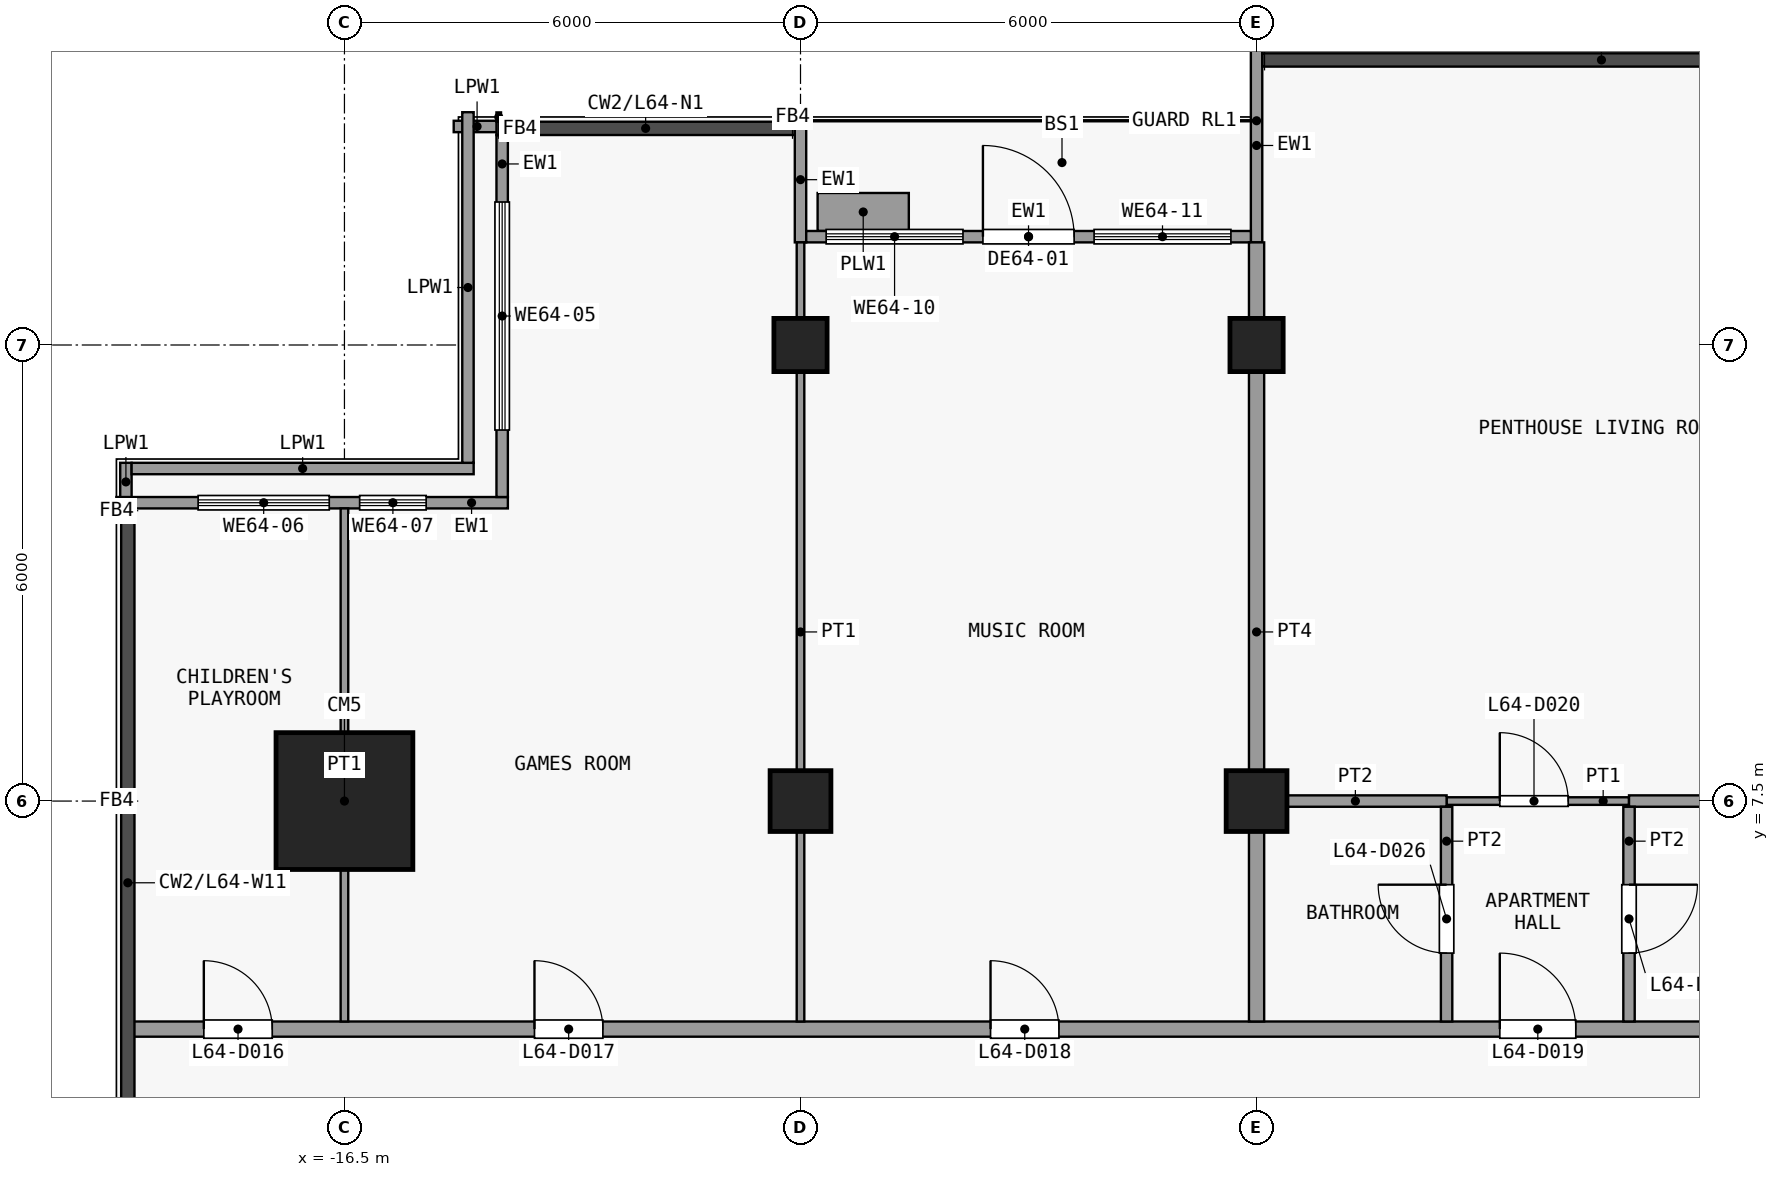
"""IFC4 building model, lengths in metres.
Left out: names, types, materials, properties, quantities, classifications, styles, units other than length and angle.
Written with IfcOpenShell. Run it as: python <this file> out.ifc"""

import sys

from ifc_helpers import new_model, si_unit, direction, frame, frame_2d, origin, origin_2d, place, context, subcontext, project, spatial, rectangle, extrude, element, fill, save


model = new_model("IFC4")
c1 = context("Model", 3, precision=1e-05, world=origin(), true_north=direction((0.0, 1.0)))
c2 = subcontext(c1, "Body", "Model", "MODEL_VIEW")
j1 = project(units=[si_unit("LENGTHUNIT", "METRE"), si_unit("PLANEANGLEUNIT", "RADIAN")], contexts=[c1])
p1 = place(None, origin())
s1 = spatial("IfcSite", under=j1, at=p1, CompositionType="ELEMENT")
p2 = place(p1, origin())
s2 = spatial("IfcBuilding", under=s1, at=p2, CompositionType="ELEMENT")
p3 = place(p2, frame((0.0, 0.0, 255.5)))
s3 = spatial("IfcBuildingStorey", under=s2, at=p3, CompositionType="ELEMENT", Elevation=255.5)
p4 = place(p3, frame((-16.5, 7.5, 0.0), z_axis=(0.0, 0.0, 1.0), x_axis=(1.0, 0.0, 0.0)))
e1 = element("IfcColumn", 1, at=p4, inside=s3, PredefinedType="COLUMN", context=c2, shape_type="SweptSolid", body=[
    extrude(rectangle(XDim=1.8, YDim=1.8, at=origin_2d()), origin(), (0.0, 0.0, 1.0), 3.6),
])
p5 = place(p3, frame((-10.5, 7.5, 0.0), z_axis=(0.0, 0.0, 1.0), x_axis=(1.0, 0.0, 0.0)))
e2 = element("IfcColumn", 2, at=p5, inside=s3, PredefinedType="COLUMN", context=c2, shape_type="SweptSolid", body=[
    extrude(rectangle(XDim=0.8, YDim=0.8, at=origin_2d()), origin(), (0.0, 0.0, 1.0), 3.6),
])
p6 = place(p3, frame((-10.5, 13.5, 0.0), z_axis=(0.0, 0.0, 1.0), x_axis=(1.0, 0.0, 0.0)))
e3 = element("IfcColumn", 3, at=p6, inside=s3, PredefinedType="COLUMN", context=c2, shape_type="SweptSolid", body=[
    extrude(rectangle(XDim=0.7, YDim=0.7, at=origin_2d()), origin(), (0.0, 0.0, 1.0), 3.6),
])
p7 = place(p3, frame((-4.5, 7.5, 0.0), z_axis=(0.0, 0.0, 1.0), x_axis=(1.0, 0.0, 0.0)))
e4 = element("IfcColumn", 4, at=p7, inside=s3, PredefinedType="COLUMN", context=c2, shape_type="SweptSolid", body=[
    extrude(rectangle(XDim=0.8, YDim=0.8, at=origin_2d()), origin(), (0.0, 0.0, 1.0), 3.6),
])
p8 = place(p3, frame((-4.5, 13.5, 0.0), z_axis=(0.0, 0.0, 1.0), x_axis=(1.0, 0.0, 0.0)))
e5 = element("IfcColumn", 5, at=p8, inside=s3, PredefinedType="COLUMN", context=c2, shape_type="SweptSolid", body=[
    extrude(rectangle(XDim=0.7, YDim=0.7, at=origin_2d()), origin(), (0.0, 0.0, 1.0), 3.6),
])
p9 = place(p3, frame((-14.425, 11.5, 0.0), z_axis=(0.0, 0.0, 1.0), x_axis=(0.0, 1.0, 0.0)))
e6 = element("IfcWall", 6, at=p9, inside=s3, PredefinedType="SOLIDWALL", context=c2, shape_type="SweptSolid", body=[
    extrude(rectangle(XDim=4.762, YDim=0.15, at=frame_2d((2.381, 0.0))), origin(), (0.0, 0.0, 1.0), 3.3),
])
p10 = place(p9, frame((0.881, 0.0, 0.9)))
e7 = element("IfcOpeningElement", 7, at=p10, cuts=e6, PredefinedType="OPENING", context=c2, shape_type="SweptSolid", body=[
    extrude(rectangle(XDim=3.0, YDim=2.4, at=frame_2d((1.5, 1.2))), frame((0.0, 0.085, 0.0), z_axis=(0.0, -1.0, 0.0), x_axis=(1.0, 0.0, 0.0)), (0.0, 0.0, 1.0), 0.17),
])
p11 = place(p3, frame((-19.5, 11.425, 0.0), z_axis=(0.0, 0.0, 1.0), x_axis=(1.0, 0.0, 0.0)))
e8 = element("IfcWall", 8, at=p11, inside=s3, PredefinedType="SOLIDWALL", context=c2, shape_type="SweptSolid", body=[
    extrude(rectangle(XDim=5.15, YDim=0.15, at=frame_2d((2.575, 0.0))), origin(), (0.0, 0.0, 1.0), 3.3),
])
p12 = place(p11, frame((1.075, 0.0, 0.9)))
e9 = element("IfcOpeningElement", 9, at=p12, cuts=e8, PredefinedType="OPENING", context=c2, shape_type="SweptSolid", body=[
    extrude(rectangle(XDim=1.725, YDim=2.4, at=frame_2d((0.863, 1.2))), frame((0.0, 0.085, 0.0), z_axis=(0.0, -1.0, 0.0), x_axis=(1.0, 0.0, 0.0)), (0.0, 0.0, 1.0), 0.17),
])
p13 = place(p11, frame((3.2, 0.0, 0.9)))
e10 = element("IfcOpeningElement", 10, at=p13, cuts=e8, PredefinedType="OPENING", context=c2, shape_type="SweptSolid", body=[
    extrude(rectangle(XDim=0.875, YDim=2.4, at=frame_2d((0.438, 1.2))), frame((0.0, 0.085, 0.0), z_axis=(0.0, -1.0, 0.0), x_axis=(1.0, 0.0, 0.0)), (0.0, 0.0, 1.0), 0.17),
])
p14 = place(p3, frame((-10.5, 14.85, 0.0), z_axis=(0.0, 0.0, 1.0), x_axis=(0.0, 1.0, 0.0)))
e11 = element("IfcWall", 11, at=p14, inside=s3, PredefinedType="SOLIDWALL", context=c2, shape_type="SweptSolid", body=[
    extrude(rectangle(XDim=1.65, YDim=0.15, at=frame_2d((0.825, 0.0))), origin(), (0.0, 0.0, 1.0), 3.3),
])
p15 = place(p3, frame((-4.5, 14.85, 0.0), z_axis=(0.0, 0.0, 1.0), x_axis=(0.0, 1.0, 0.0)))
e12 = element("IfcWall", 12, at=p15, inside=s3, PredefinedType="SOLIDWALL", context=c2, shape_type="SweptSolid", body=[
    extrude(rectangle(XDim=2.55, YDim=0.15, at=frame_2d((1.275, 0.0))), origin(), (0.0, 0.0, 1.0), 3.3),
])
p16 = place(p3, frame((-10.425, 14.925, 0.0), z_axis=(0.0, 0.0, 1.0), x_axis=(1.0, 0.0, 0.0)))
e13 = element("IfcWall", 13, at=p16, inside=s3, PredefinedType="SOLIDWALL", context=c2, shape_type="SweptSolid", body=[
    extrude(rectangle(XDim=5.85, YDim=0.15, at=frame_2d((2.925, 0.0))), origin(), (0.0, 0.0, 1.0), 3.3),
])
p17 = place(p16, frame((2.325, 0.0, 0.0)))
e14 = element("IfcOpeningElement", 14, at=p17, cuts=e13, PredefinedType="OPENING", context=c2, shape_type="SweptSolid", body=[
    extrude(rectangle(XDim=1.2, YDim=2.4, at=frame_2d((0.6, 1.2))), frame((0.0, 0.085, 0.0), z_axis=(0.0, -1.0, 0.0), x_axis=(1.0, 0.0, 0.0)), (0.0, 0.0, 1.0), 0.17),
])
p18 = place(p16, frame((0.262, 0.0, 0.9)))
e15 = element("IfcOpeningElement", 15, at=p18, cuts=e13, PredefinedType="OPENING", context=c2, shape_type="SweptSolid", body=[
    extrude(rectangle(XDim=1.8, YDim=2.1, at=frame_2d((0.9, 1.05))), frame((0.0, 0.085, 0.0), z_axis=(0.0, -1.0, 0.0), x_axis=(1.0, 0.0, 0.0)), (0.0, 0.0, 1.0), 0.17),
])
p19 = place(p16, frame((3.788, 0.0, 0.9)))
e16 = element("IfcOpeningElement", 16, at=p19, cuts=e13, PredefinedType="OPENING", context=c2, shape_type="SweptSolid", body=[
    extrude(rectangle(XDim=1.8, YDim=2.1, at=frame_2d((0.9, 1.05))), frame((0.0, 0.085, 0.0), z_axis=(0.0, -1.0, 0.0), x_axis=(1.0, 0.0, 0.0)), (0.0, 0.0, 1.0), 0.17),
])
p20 = place(p3, frame((-10.275, 15.25, 0.0), z_axis=(0.0, 0.0, 1.0), x_axis=(1.0, 0.0, 0.0)))
e17 = element("IfcWall", 17, at=p20, inside=s3, PredefinedType="USERDEFINED", context=c2, shape_type="SweptSolid", body=[
    extrude(rectangle(XDim=1.2, YDim=0.5, at=frame_2d((0.6, 0.0))), origin(), (0.0, 0.0, 1.0), 0.9),
])
p21 = place(p3, frame((-15.062, 16.375, 0.0), z_axis=(0.0, 0.0, 1.0), x_axis=(1.0, 0.0, 0.0)))
e18 = element("IfcWall", 18, at=p21, inside=s3, PredefinedType="PARAPET", context=c2, shape_type="SweptSolid", body=[
    extrude(rectangle(XDim=0.615, YDim=0.15, at=frame_2d((0.308, 0.0))), origin(), (0.0, 0.0, 1.0), 1.15),
])
p22 = place(p3, frame((-19.375, 11.448, 0.0), z_axis=(0.0, 0.0, 1.0), x_axis=(0.0, 1.0, 0.0)))
e19 = element("IfcWall", 19, at=p22, inside=s3, PredefinedType="PARAPET", context=c2, shape_type="SweptSolid", body=[
    extrude(rectangle(XDim=0.502, YDim=0.15, at=frame_2d((0.251, 0.0))), origin(), (0.0, 0.0, 1.0), 1.15),
])
p23 = place(p3, frame((-19.3, 11.875, 0.0), z_axis=(0.0, 0.0, 1.0), x_axis=(1.0, 0.0, 0.0)))
e20 = element("IfcWall", 20, at=p23, inside=s3, PredefinedType="PARAPET", context=c2, shape_type="SweptSolid", body=[
    extrude(rectangle(XDim=4.5, YDim=0.15, at=frame_2d((2.25, 0.0))), origin(), (0.0, 0.0, 1.0), 1.15),
])
p24 = place(p3, frame((-14.875, 11.95, 0.0), z_axis=(0.0, 0.0, 1.0), x_axis=(0.0, 1.0, 0.0)))
e21 = element("IfcWall", 21, at=p24, inside=s3, PredefinedType="PARAPET", context=c2, shape_type="SweptSolid", body=[
    extrude(rectangle(XDim=4.613, YDim=0.15, at=frame_2d((2.306, 0.0))), origin(), (0.0, 0.0, 1.0), 1.15),
])
p25 = place(p3, frame((-19.35, 4.5, 0.0), z_axis=(0.0, 0.0, 1.0), x_axis=(1.0, 0.0, 0.0)))
e22 = element("IfcWall", 22, at=p25, inside=s3, PredefinedType="PARTITIONING", context=c2, shape_type="SweptSolid", body=[
    extrude(rectangle(XDim=39.6, YDim=0.2, at=frame_2d((19.8, 0.0))), origin(), (0.0, 0.0, 1.0), 3.3),
])
p26 = place(p25, frame((1.0, 0.0, 0.0)))
e23 = element("IfcOpeningElement", 23, at=p26, cuts=e22, PredefinedType="OPENING", context=c2, shape_type="SweptSolid", body=[
    extrude(rectangle(XDim=0.9, YDim=2.1, at=frame_2d((0.45, 1.05))), frame((0.0, 0.11, 0.0), z_axis=(0.0, -1.0, 0.0), x_axis=(1.0, 0.0, 0.0)), (0.0, 0.0, 1.0), 0.22),
])
p27 = place(p25, frame((5.35, 0.0, 0.0)))
e24 = element("IfcOpeningElement", 24, at=p27, cuts=e22, PredefinedType="OPENING", context=c2, shape_type="SweptSolid", body=[
    extrude(rectangle(XDim=0.9, YDim=2.1, at=frame_2d((0.45, 1.05))), frame((0.0, 0.11, 0.0), z_axis=(0.0, -1.0, 0.0), x_axis=(1.0, 0.0, 0.0)), (0.0, 0.0, 1.0), 0.22),
])
p28 = place(p25, frame((11.35, 0.0, 0.0)))
e25 = element("IfcOpeningElement", 25, at=p28, cuts=e22, PredefinedType="OPENING", context=c2, shape_type="SweptSolid", body=[
    extrude(rectangle(XDim=0.9, YDim=2.1, at=frame_2d((0.45, 1.05))), frame((0.0, 0.11, 0.0), z_axis=(0.0, -1.0, 0.0), x_axis=(1.0, 0.0, 0.0)), (0.0, 0.0, 1.0), 0.22),
])
p29 = place(p25, frame((18.05, 0.0, 0.0)))
e26 = element("IfcOpeningElement", 26, at=p29, cuts=e22, PredefinedType="OPENING", context=c2, shape_type="SweptSolid", body=[
    extrude(rectangle(XDim=1.0, YDim=2.1, at=frame_2d((0.5, 1.05))), frame((0.0, 0.11, 0.0), z_axis=(0.0, -1.0, 0.0), x_axis=(1.0, 0.0, 0.0)), (0.0, 0.0, 1.0), 0.22),
])
p30 = place(p3, frame((-2.0, 7.5, 0.0), z_axis=(0.0, 0.0, 1.0), x_axis=(1.0, 0.0, 0.0)))
e27 = element("IfcWall", 27, at=p30, inside=s3, PredefinedType="PARTITIONING", context=c2, shape_type="SweptSolid", body=[
    extrude(rectangle(XDim=2.4, YDim=0.1, at=frame_2d((1.2, 0.0))), origin(), (0.0, 0.0, 1.0), 3.3),
])
p31 = place(p30, frame((0.7, 0.0, 0.0)))
e28 = element("IfcOpeningElement", 28, at=p31, cuts=e27, PredefinedType="OPENING", context=c2, shape_type="SweptSolid", body=[
    extrude(rectangle(XDim=0.9, YDim=2.1, at=frame_2d((0.45, 1.05))), frame((0.0, 0.06, 0.0), z_axis=(0.0, -1.0, 0.0), x_axis=(1.0, 0.0, 0.0)), (0.0, 0.0, 1.0), 0.12),
])
p32 = place(p3, frame((-4.4, 7.5, 0.0), z_axis=(0.0, 0.0, 1.0), x_axis=(1.0, 0.0, 0.0)))
e29 = element("IfcWall", 29, at=p32, inside=s3, PredefinedType="PARTITIONING", context=c2, shape_type="SweptSolid", body=[
    extrude(rectangle(XDim=2.4, YDim=0.15, at=frame_2d((1.2, 0.0))), origin(), (0.0, 0.0, 1.0), 3.3),
])
p33 = place(p3, frame((0.4, 7.5, 0.0), z_axis=(0.0, 0.0, 1.0), x_axis=(1.0, 0.0, 0.0)))
e30 = element("IfcWall", 30, at=p33, inside=s3, PredefinedType="PARTITIONING", context=c2, shape_type="SweptSolid", body=[
    extrude(rectangle(XDim=14.917, YDim=0.15, at=frame_2d((7.458, 0.0))), origin(), (0.0, 0.0, 1.0), 3.3),
])
p34 = place(p3, frame((-16.5, 4.6, 0.0), z_axis=(0.0, 0.0, 1.0), x_axis=(0.0, 1.0, 0.0)))
e31 = element("IfcWall", 31, at=p34, inside=s3, PredefinedType="PARTITIONING", context=c2, shape_type="SweptSolid", body=[
    extrude(rectangle(XDim=6.75, YDim=0.1, at=frame_2d((3.375, 0.0))), origin(), (0.0, 0.0, 1.0), 3.3),
])
p35 = place(p3, frame((-10.5, 4.6, 0.0), z_axis=(0.0, 0.0, 1.0), x_axis=(0.0, 1.0, 0.0)))
e32 = element("IfcWall", 32, at=p35, inside=s3, PredefinedType="PARTITIONING", context=c2, shape_type="SweptSolid", body=[
    extrude(rectangle(XDim=10.25, YDim=0.1, at=frame_2d((5.125, 0.0))), origin(), (0.0, 0.0, 1.0), 3.3),
])
p36 = place(p3, frame((-4.5, 4.6, 0.0), z_axis=(0.0, 0.0, 1.0), x_axis=(0.0, 1.0, 0.0)))
e33 = element("IfcWall", 33, at=p36, inside=s3, PredefinedType="PARTITIONING", context=c2, shape_type="SweptSolid", body=[
    extrude(rectangle(XDim=10.25, YDim=0.2, at=frame_2d((5.125, 0.0))), origin(), (0.0, 0.0, 1.0), 3.3),
])
p37 = place(p3, frame((-2.0, 4.6, 0.0), z_axis=(0.0, 0.0, 1.0), x_axis=(0.0, 1.0, 0.0)))
e34 = element("IfcWall", 34, at=p37, inside=s3, PredefinedType="PARTITIONING", context=c2, shape_type="SweptSolid", body=[
    extrude(rectangle(XDim=2.825, YDim=0.15, at=frame_2d((1.413, 0.0))), origin(), (0.0, 0.0, 1.0), 3.3),
])
p38 = place(p37, frame((0.9, 0.0, 0.0)))
e35 = element("IfcOpeningElement", 35, at=p38, cuts=e34, PredefinedType="OPENING", context=c2, shape_type="SweptSolid", body=[
    extrude(rectangle(XDim=0.9, YDim=2.1, at=frame_2d((0.45, 1.05))), frame((0.0, 0.085, 0.0), z_axis=(0.0, -1.0, 0.0), x_axis=(1.0, 0.0, 0.0)), (0.0, 0.0, 1.0), 0.17),
])
p39 = place(p3, frame((0.4, 4.6, 0.0), z_axis=(0.0, 0.0, 1.0), x_axis=(0.0, 1.0, 0.0)))
e36 = element("IfcWall", 36, at=p39, inside=s3, PredefinedType="PARTITIONING", context=c2, shape_type="SweptSolid", body=[
    extrude(rectangle(XDim=2.825, YDim=0.15, at=frame_2d((1.413, 0.0))), origin(), (0.0, 0.0, 1.0), 3.3),
])
p40 = place(p39, frame((0.9, 0.0, 0.0)))
e37 = element("IfcOpeningElement", 37, at=p40, cuts=e36, PredefinedType="OPENING", context=c2, shape_type="SweptSolid", body=[
    extrude(rectangle(XDim=0.9, YDim=2.1, at=frame_2d((0.45, 1.05))), frame((0.0, 0.085, 0.0), z_axis=(0.0, -1.0, 0.0), x_axis=(1.0, 0.0, 0.0)), (0.0, 0.0, 1.0), 0.17),
])
p41 = place(p10, origin())
e38 = element("IfcWindow", 38, at=p41, inside=s3, PartitioningType="SINGLE_PANEL", PredefinedType="WINDOW", context=c2, shape_type="SweptSolid", body=[
    extrude(rectangle(XDim=3.0, YDim=2.4, at=frame_2d((1.5, 1.2))), frame((0.0, 0.03, 0.0), z_axis=(0.0, -1.0, 0.0), x_axis=(1.0, 0.0, 0.0)), (0.0, 0.0, 1.0), 0.06),
])
fill(e7, e38)
p42 = place(p12, origin())
e39 = element("IfcWindow", 39, at=p42, inside=s3, PartitioningType="SINGLE_PANEL", PredefinedType="WINDOW", context=c2, shape_type="SweptSolid", body=[
    extrude(rectangle(XDim=1.725, YDim=2.4, at=frame_2d((0.863, 1.2))), frame((0.0, 0.03, 0.0), z_axis=(0.0, -1.0, 0.0), x_axis=(1.0, 0.0, 0.0)), (0.0, 0.0, 1.0), 0.06),
])
fill(e9, e39)
p43 = place(p13, origin())
e40 = element("IfcWindow", 40, at=p43, inside=s3, PartitioningType="SINGLE_PANEL", PredefinedType="WINDOW", context=c2, shape_type="SweptSolid", body=[
    extrude(rectangle(XDim=0.875, YDim=2.4, at=frame_2d((0.438, 1.2))), frame((0.0, 0.03, 0.0), z_axis=(0.0, -1.0, 0.0), x_axis=(1.0, 0.0, 0.0)), (0.0, 0.0, 1.0), 0.06),
])
fill(e10, e40)
p44 = place(p17, origin())
e41 = element("IfcDoor", 41, at=p44, inside=s3, OperationType="SINGLE_SWING_LEFT", PredefinedType="DOOR", context=c2, shape_type="SweptSolid", body=[
    extrude(rectangle(XDim=1.2, YDim=2.4, at=frame_2d((0.6, 1.2))), frame((0.0, 0.025, 0.0), z_axis=(0.0, -1.0, 0.0), x_axis=(1.0, 0.0, 0.0)), (0.0, 0.0, 1.0), 0.05),
])
fill(e14, e41)
p45 = place(p18, origin())
e42 = element("IfcWindow", 42, at=p45, inside=s3, PartitioningType="SINGLE_PANEL", PredefinedType="WINDOW", context=c2, shape_type="SweptSolid", body=[
    extrude(rectangle(XDim=1.8, YDim=2.1, at=frame_2d((0.9, 1.05))), frame((0.0, 0.03, 0.0), z_axis=(0.0, -1.0, 0.0), x_axis=(1.0, 0.0, 0.0)), (0.0, 0.0, 1.0), 0.06),
])
fill(e15, e42)
p46 = place(p19, origin())
e43 = element("IfcWindow", 43, at=p46, inside=s3, PartitioningType="SINGLE_PANEL", PredefinedType="WINDOW", context=c2, shape_type="SweptSolid", body=[
    extrude(rectangle(XDim=1.8, YDim=2.1, at=frame_2d((0.9, 1.05))), frame((0.0, 0.03, 0.0), z_axis=(0.0, -1.0, 0.0), x_axis=(1.0, 0.0, 0.0)), (0.0, 0.0, 1.0), 0.06),
])
fill(e16, e43)
p47 = place(p26, origin())
e44 = element("IfcDoor", 44, at=p47, inside=s3, OperationType="SINGLE_SWING_RIGHT", PredefinedType="DOOR", context=c2, shape_type="SweptSolid", body=[
    extrude(rectangle(XDim=0.9, YDim=2.1, at=frame_2d((0.45, 1.05))), frame((0.0, 0.025, 0.0), z_axis=(0.0, -1.0, 0.0), x_axis=(1.0, 0.0, 0.0)), (0.0, 0.0, 1.0), 0.05),
])
fill(e23, e44)
p48 = place(p27, origin())
e45 = element("IfcDoor", 45, at=p48, inside=s3, OperationType="SINGLE_SWING_RIGHT", PredefinedType="DOOR", context=c2, shape_type="SweptSolid", body=[
    extrude(rectangle(XDim=0.9, YDim=2.1, at=frame_2d((0.45, 1.05))), frame((0.0, 0.025, 0.0), z_axis=(0.0, -1.0, 0.0), x_axis=(1.0, 0.0, 0.0)), (0.0, 0.0, 1.0), 0.05),
])
fill(e24, e45)
p49 = place(p28, origin())
e46 = element("IfcDoor", 46, at=p49, inside=s3, OperationType="SINGLE_SWING_RIGHT", PredefinedType="DOOR", context=c2, shape_type="SweptSolid", body=[
    extrude(rectangle(XDim=0.9, YDim=2.1, at=frame_2d((0.45, 1.05))), frame((0.0, 0.025, 0.0), z_axis=(0.0, -1.0, 0.0), x_axis=(1.0, 0.0, 0.0)), (0.0, 0.0, 1.0), 0.05),
])
fill(e25, e46)
p50 = place(p29, origin())
e47 = element("IfcDoor", 47, at=p50, inside=s3, OperationType="SINGLE_SWING_RIGHT", PredefinedType="DOOR", context=c2, shape_type="SweptSolid", body=[
    extrude(rectangle(XDim=1.0, YDim=2.1, at=frame_2d((0.5, 1.05))), frame((0.0, 0.025, 0.0), z_axis=(0.0, -1.0, 0.0), x_axis=(1.0, 0.0, 0.0)), (0.0, 0.0, 1.0), 0.05),
])
fill(e26, e47)
p51 = place(p31, origin())
e48 = element("IfcDoor", 48, at=p51, inside=s3, OperationType="SINGLE_SWING_RIGHT", PredefinedType="DOOR", context=c2, shape_type="SweptSolid", body=[
    extrude(rectangle(XDim=0.9, YDim=2.1, at=frame_2d((0.45, 1.05))), frame((0.0, 0.025, 0.0), z_axis=(0.0, -1.0, 0.0), x_axis=(1.0, 0.0, 0.0)), (0.0, 0.0, 1.0), 0.05),
])
fill(e28, e48)
p52 = place(p38, origin())
e49 = element("IfcDoor", 49, at=p52, inside=s3, OperationType="SINGLE_SWING_LEFT", PredefinedType="DOOR", context=c2, shape_type="SweptSolid", body=[
    extrude(rectangle(XDim=0.9, YDim=2.1, at=frame_2d((0.45, 1.05))), frame((0.0, 0.025, 0.0), z_axis=(0.0, -1.0, 0.0), x_axis=(1.0, 0.0, 0.0)), (0.0, 0.0, 1.0), 0.05),
])
fill(e35, e49)
p53 = place(p40, origin())
e50 = element("IfcDoor", 50, at=p53, inside=s3, OperationType="SINGLE_SWING_RIGHT", PredefinedType="DOOR", context=c2, shape_type="SweptSolid", body=[
    extrude(rectangle(XDim=0.9, YDim=2.1, at=frame_2d((0.45, 1.05))), frame((0.0, 0.025, 0.0), z_axis=(0.0, -1.0, 0.0), x_axis=(1.0, 0.0, 0.0)), (0.0, 0.0, 1.0), 0.05),
])
fill(e37, e50)
save(model, sys.argv[1])
